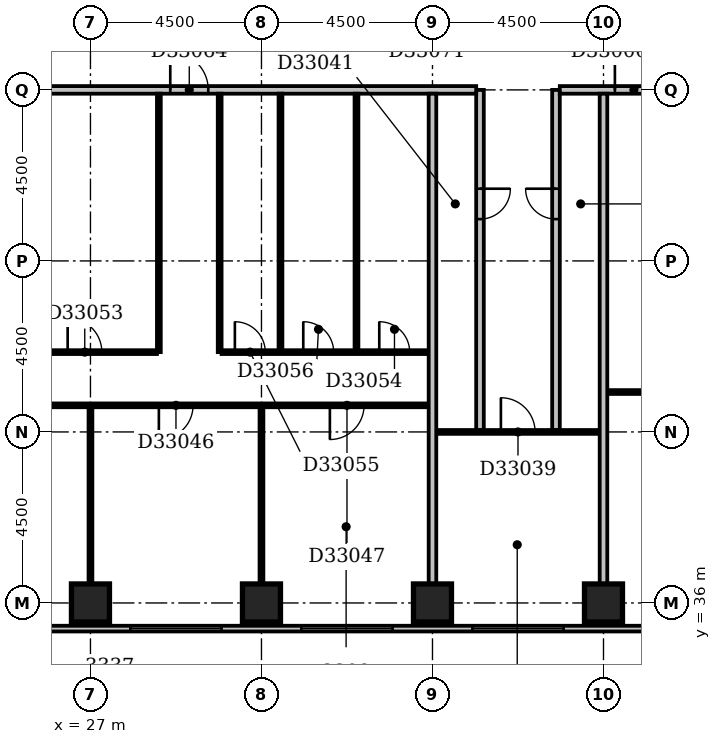
"""IFC4 building model, lengths in metres.
Left out: names, types, materials, properties, quantities, classifications, styles, units other than length and angle.
Written with IfcOpenShell. Run it as: python <this file> out.ifc"""

import sys

from ifc_helpers import new_model, si_unit, direction, frame, frame_2d, origin, origin_2d, place, context, subcontext, project, spatial, rectangle, extrude, element, fill, save


model = new_model("IFC4")
c1 = context("Model", 3, precision=1e-05, world=origin(), true_north=direction((0.0, 1.0)))
c2 = subcontext(c1, "Body", "Model", "MODEL_VIEW")
j1 = project(units=[si_unit("LENGTHUNIT", "METRE"), si_unit("PLANEANGLEUNIT", "RADIAN")], contexts=[c1])
p1 = place(None, origin())
s1 = spatial("IfcSite", under=j1, at=p1, CompositionType="ELEMENT")
p2 = place(p1, origin())
s2 = spatial("IfcBuilding", under=s1, at=p2, CompositionType="ELEMENT")
p3 = place(p2, frame((0.0, 0.0, 134.0)))
s3 = spatial("IfcBuildingStorey", under=s2, at=p3, CompositionType="ELEMENT", Elevation=134.0)
for number, where, z_axis, x_axis in (
    (1, (27.0, 36.0, -0.3), (0.0, 0.0, 1.0), (1.0, 0.0, 0.0)),
    (2, (31.5, 36.0, -0.3), (0.0, 0.0, 1.0), (1.0, 0.0, 0.0)),
    (3, (36.0, 36.0, -0.3), (0.0, 0.0, 1.0), (1.0, 0.0, 0.0)),
    (4, (40.5, 36.0, -0.3), (0.0, 0.0, 1.0), (1.0, 0.0, 0.0)),
):
    element("IfcColumn", number, at=place(p3, frame(where, z_axis=z_axis, x_axis=x_axis)), inside=s3, PredefinedType="COLUMN", context=c2, shape_type="SweptSolid", body=[
        extrude(rectangle(XDim=1.0, YDim=1.0, at=origin_2d()), origin(), (0.0, 0.0, 1.0), 3.6),
    ])
p4 = place(p3, frame((23.1, 35.325, 0.0), z_axis=(0.0, 0.0, 1.0), x_axis=(1.0, 0.0, 0.0)))
e5 = element("IfcWall", 5, at=p4, inside=s3, PredefinedType="STANDARD", context=c2, shape_type="SweptSolid", body=[
    extrude(rectangle(XDim=45.15, YDim=0.15, at=frame_2d((22.575, 0.0))), origin(), (0.0, 0.0, 1.0), 2.7),
])
p5 = place(p4, frame((0.312, 0.0, 0.6)))
e6 = element("IfcOpeningElement", 6, at=p5, cuts=e5, PredefinedType="OPENING", context=c2, shape_type="SweptSolid", body=[
    extrude(rectangle(XDim=2.1, YDim=1.8, at=frame_2d((1.05, 0.9))), frame((0.0, 0.087, 0.0), z_axis=(0.0, -1.0, 0.0), x_axis=(1.0, 0.0, 0.0)), (0.0, 0.0, 1.0), 0.174),
])
p6 = place(p4, frame((4.95, 0.0, 0.6)))
e7 = element("IfcOpeningElement", 7, at=p6, cuts=e5, PredefinedType="OPENING", context=c2, shape_type="SweptSolid", body=[
    extrude(rectangle(XDim=2.4, YDim=1.8, at=frame_2d((1.2, 0.9))), frame((0.0, 0.087, 0.0), z_axis=(0.0, -1.0, 0.0), x_axis=(1.0, 0.0, 0.0)), (0.0, 0.0, 1.0), 0.174),
])
p7 = place(p4, frame((9.45, 0.0, 0.6)))
e8 = element("IfcOpeningElement", 8, at=p7, cuts=e5, PredefinedType="OPENING", context=c2, shape_type="SweptSolid", body=[
    extrude(rectangle(XDim=2.4, YDim=1.8, at=frame_2d((1.2, 0.9))), frame((0.0, 0.087, 0.0), z_axis=(0.0, -1.0, 0.0), x_axis=(1.0, 0.0, 0.0)), (0.0, 0.0, 1.0), 0.174),
])
p8 = place(p4, frame((13.95, 0.0, 0.6)))
e9 = element("IfcOpeningElement", 9, at=p8, cuts=e5, PredefinedType="OPENING", context=c2, shape_type="SweptSolid", body=[
    extrude(rectangle(XDim=2.4, YDim=1.8, at=frame_2d((1.2, 0.9))), frame((0.0, 0.087, 0.0), z_axis=(0.0, -1.0, 0.0), x_axis=(1.0, 0.0, 0.0)), (0.0, 0.0, 1.0), 0.174),
])
p9 = place(p4, frame((18.45, 0.0, 0.6)))
e10 = element("IfcOpeningElement", 10, at=p9, cuts=e5, PredefinedType="OPENING", context=c2, shape_type="SweptSolid", body=[
    extrude(rectangle(XDim=2.4, YDim=1.8, at=frame_2d((1.2, 0.9))), frame((0.0, 0.087, 0.0), z_axis=(0.0, -1.0, 0.0), x_axis=(1.0, 0.0, 0.0)), (0.0, 0.0, 1.0), 0.174),
])
p10 = place(p4, frame((24.146, 0.0, 0.6)))
e11 = element("IfcOpeningElement", 11, at=p10, cuts=e5, PredefinedType="OPENING", context=c2, shape_type="SweptSolid", body=[
    extrude(rectangle(XDim=1.5, YDim=1.8, at=frame_2d((0.75, 0.9))), frame((0.0, 0.087, 0.0), z_axis=(0.0, -1.0, 0.0), x_axis=(1.0, 0.0, 0.0)), (0.0, 0.0, 1.0), 0.174),
])
p11 = place(p4, frame((27.131, 0.0, 0.6)))
e12 = element("IfcOpeningElement", 12, at=p11, cuts=e5, PredefinedType="OPENING", context=c2, shape_type="SweptSolid", body=[
    extrude(rectangle(XDim=2.4, YDim=1.8, at=frame_2d((1.2, 0.9))), frame((0.0, 0.087, 0.0), z_axis=(0.0, -1.0, 0.0), x_axis=(1.0, 0.0, 0.0)), (0.0, 0.0, 1.0), 0.174),
])
p12 = place(p4, frame((31.95, 0.0, 0.6)))
e13 = element("IfcOpeningElement", 13, at=p12, cuts=e5, PredefinedType="OPENING", context=c2, shape_type="SweptSolid", body=[
    extrude(rectangle(XDim=2.4, YDim=1.8, at=frame_2d((1.2, 0.9))), frame((0.0, 0.087, 0.0), z_axis=(0.0, -1.0, 0.0), x_axis=(1.0, 0.0, 0.0)), (0.0, 0.0, 1.0), 0.174),
])
p13 = place(p4, frame((36.45, 0.0, 0.6)))
e14 = element("IfcOpeningElement", 14, at=p13, cuts=e5, PredefinedType="OPENING", context=c2, shape_type="SweptSolid", body=[
    extrude(rectangle(XDim=2.4, YDim=1.8, at=frame_2d((1.2, 0.9))), frame((0.0, 0.087, 0.0), z_axis=(0.0, -1.0, 0.0), x_axis=(1.0, 0.0, 0.0)), (0.0, 0.0, 1.0), 0.174),
])
p14 = place(p4, frame((40.95, 0.0, 0.6)))
e15 = element("IfcOpeningElement", 15, at=p14, cuts=e5, PredefinedType="OPENING", context=c2, shape_type="SweptSolid", body=[
    extrude(rectangle(XDim=2.4, YDim=1.8, at=frame_2d((1.2, 0.9))), frame((0.0, 0.087, 0.0), z_axis=(0.0, -1.0, 0.0), x_axis=(1.0, 0.0, 0.0)), (0.0, 0.0, 1.0), 0.174),
])
p15 = place(p3, frame((27.0, 36.5, 0.0), z_axis=(0.0, 0.0, 1.0), x_axis=(0.0, 1.0, 0.0)))
e16 = element("IfcWall", 16, at=p15, inside=s3, PredefinedType="PARTITIONING", context=c2, shape_type="SweptSolid", body=[
    extrude(rectangle(XDim=4.65, YDim=0.1, at=frame_2d((2.325, 0.0))), origin(), (0.0, 0.0, 1.0), 2.6),
])
p16 = place(p3, frame((31.5, 36.5, 0.0), z_axis=(0.0, 0.0, 1.0), x_axis=(0.0, 1.0, 0.0)))
e17 = element("IfcWall", 17, at=p16, inside=s3, PredefinedType="PARTITIONING", context=c2, shape_type="SweptSolid", body=[
    extrude(rectangle(XDim=4.65, YDim=0.1, at=frame_2d((2.325, 0.0))), origin(), (0.0, 0.0, 1.0), 3.3),
])
p17 = place(p3, frame((36.0, 36.5, 0.0), z_axis=(0.0, 0.0, 1.0), x_axis=(0.0, 1.0, 0.0)))
e18 = element("IfcWall", 18, at=p17, inside=s3, PredefinedType="PARTITIONING", context=c2, shape_type="SweptSolid", body=[
    extrude(rectangle(XDim=12.9, YDim=0.2, at=frame_2d((6.45, 0.0))), origin(), (0.0, 0.0, 1.0), 2.4),
])
p18 = place(p3, frame((40.5, 36.5, 0.0), z_axis=(0.0, 0.0, 1.0), x_axis=(0.0, 1.0, 0.0)))
e19 = element("IfcWall", 19, at=p18, inside=s3, PredefinedType="PARTITIONING", context=c2, shape_type="SweptSolid", body=[
    extrude(rectangle(XDim=12.9, YDim=0.2, at=frame_2d((6.45, 0.0))), origin(), (0.0, 0.0, 1.0), 3.3),
])
p19 = place(p3, frame((36.1, 40.5, 0.0), z_axis=(0.0, 0.0, 1.0), x_axis=(1.0, 0.0, 0.0)))
e20 = element("IfcWall", 20, at=p19, inside=s3, PredefinedType="PARTITIONING", context=c2, shape_type="SweptSolid", body=[
    extrude(rectangle(XDim=4.3, YDim=0.1, at=frame_2d((2.15, 0.0))), origin(), (0.0, 0.0, 1.0), 3.3),
])
p20 = place(p19, frame((1.7, 0.0, 0.0)))
e21 = element("IfcOpeningElement", 21, at=p20, cuts=e20, PredefinedType="OPENING", context=c2, shape_type="SweptSolid", body=[
    extrude(rectangle(XDim=0.9, YDim=2.1, at=frame_2d((0.45, 1.05))), frame((0.0, 0.062, 0.0), z_axis=(0.0, -1.0, 0.0), x_axis=(1.0, 0.0, 0.0)), (0.0, 0.0, 1.0), 0.124),
])
p21 = place(p3, frame((37.25, 40.55, 0.0), z_axis=(0.0, 0.0, 1.0), x_axis=(0.0, 1.0, 0.0)))
e22 = element("IfcWall", 22, at=p21, inside=s3, PredefinedType="PARTITIONING", context=c2, shape_type="SweptSolid", body=[
    extrude(rectangle(XDim=8.95, YDim=0.2, at=frame_2d((4.475, 0.0))), origin(), (0.0, 0.0, 1.0), 3.3),
])
p22 = place(p21, frame((5.55, 0.0, 0.0)))
e23 = element("IfcOpeningElement", 23, at=p22, cuts=e22, PredefinedType="OPENING", context=c2, shape_type="SweptSolid", body=[
    extrude(rectangle(XDim=0.8, YDim=2.1, at=frame_2d((0.4, 1.05))), frame((0.0, 0.112, 0.0), z_axis=(0.0, -1.0, 0.0), x_axis=(1.0, 0.0, 0.0)), (0.0, 0.0, 1.0), 0.224),
])
p23 = place(p3, frame((39.25, 40.55, 0.0), z_axis=(0.0, 0.0, 1.0), x_axis=(0.0, 1.0, 0.0)))
e24 = element("IfcWall", 24, at=p23, inside=s3, PredefinedType="PARTITIONING", context=c2, shape_type="SweptSolid", body=[
    extrude(rectangle(XDim=8.95, YDim=0.2, at=frame_2d((4.475, 0.0))), origin(), (0.0, 0.0, 1.0), 3.3),
])
p24 = place(p23, frame((5.55, 0.0, 0.0)))
e25 = element("IfcOpeningElement", 25, at=p24, cuts=e24, PredefinedType="OPENING", context=c2, shape_type="SweptSolid", body=[
    extrude(rectangle(XDim=0.8, YDim=2.1, at=frame_2d((0.4, 1.05))), frame((0.0, 0.112, 0.0), z_axis=(0.0, -1.0, 0.0), x_axis=(1.0, 0.0, 0.0)), (0.0, 0.0, 1.0), 0.224),
])
p25 = place(p3, frame((22.6, 41.2, 0.0), z_axis=(0.0, 0.0, 1.0), x_axis=(1.0, 0.0, 0.0)))
e26 = element("IfcWall", 26, at=p25, inside=s3, PredefinedType="PARTITIONING", context=c2, shape_type="SweptSolid", body=[
    extrude(rectangle(XDim=13.3, YDim=0.1, at=frame_2d((6.65, 0.0))), origin(), (0.0, 0.0, 1.0), 3.3),
])
p26 = place(p25, frame((1.7, 0.0, 0.0)))
e27 = element("IfcOpeningElement", 27, at=p26, cuts=e26, PredefinedType="OPENING", context=c2, shape_type="SweptSolid", body=[
    extrude(rectangle(XDim=0.9, YDim=2.1, at=frame_2d((0.45, 1.05))), frame((0.0, 0.062, 0.0), z_axis=(0.0, -1.0, 0.0), x_axis=(1.0, 0.0, 0.0)), (0.0, 0.0, 1.0), 0.124),
])
p27 = place(p25, frame((6.2, 0.0, 0.0)))
e28 = element("IfcOpeningElement", 28, at=p27, cuts=e26, PredefinedType="OPENING", context=c2, shape_type="SweptSolid", body=[
    extrude(rectangle(XDim=0.9, YDim=2.1, at=frame_2d((0.45, 1.05))), frame((0.0, 0.062, 0.0), z_axis=(0.0, -1.0, 0.0), x_axis=(1.0, 0.0, 0.0)), (0.0, 0.0, 1.0), 0.124),
])
p28 = place(p25, frame((10.7, 0.0, 0.0)))
e29 = element("IfcOpeningElement", 29, at=p28, cuts=e26, PredefinedType="OPENING", context=c2, shape_type="SweptSolid", body=[
    extrude(rectangle(XDim=0.9, YDim=2.1, at=frame_2d((0.45, 1.05))), frame((0.0, 0.062, 0.0), z_axis=(0.0, -1.0, 0.0), x_axis=(1.0, 0.0, 0.0)), (0.0, 0.0, 1.0), 0.124),
])
p29 = place(p3, frame((40.6, 41.55, 0.0), z_axis=(0.0, 0.0, 1.0), x_axis=(1.0, 0.0, 0.0)))
e30 = element("IfcWall", 30, at=p29, inside=s3, PredefinedType="PARTITIONING", context=c2, shape_type="SweptSolid", body=[
    extrude(rectangle(XDim=13.3, YDim=0.1, at=frame_2d((6.65, 0.0))), origin(), (0.0, 0.0, 1.0), 3.3),
])
p30 = place(p29, frame((3.9, 0.0, 0.0)))
e31 = element("IfcOpeningElement", 31, at=p30, cuts=e30, PredefinedType="OPENING", context=c2, shape_type="SweptSolid", body=[
    extrude(rectangle(XDim=0.9, YDim=2.1, at=frame_2d((0.45, 1.05))), frame((0.0, 0.062, 0.0), z_axis=(0.0, -1.0, 0.0), x_axis=(1.0, 0.0, 0.0)), (0.0, 0.0, 1.0), 0.124),
])
p31 = place(p29, frame((10.7, 0.0, 0.0)))
e32 = element("IfcOpeningElement", 32, at=p31, cuts=e30, PredefinedType="OPENING", context=c2, shape_type="SweptSolid", body=[
    extrude(rectangle(XDim=0.9, YDim=2.1, at=frame_2d((0.45, 1.05))), frame((0.0, 0.062, 0.0), z_axis=(0.0, -1.0, 0.0), x_axis=(1.0, 0.0, 0.0)), (0.0, 0.0, 1.0), 0.124),
])
p32 = place(p3, frame((22.6, 42.6, 0.0), z_axis=(0.0, 0.0, 1.0), x_axis=(1.0, 0.0, 0.0)))
e33 = element("IfcWall", 33, at=p32, inside=s3, PredefinedType="PARTITIONING", context=c2, shape_type="SweptSolid", body=[
    extrude(rectangle(XDim=6.15, YDim=0.1, at=frame_2d((3.075, 0.0))), origin(), (0.0, 0.0, 1.0), 3.3),
])
p33 = place(p32, frame((0.7, 0.0, 0.0)))
e34 = element("IfcOpeningElement", 34, at=p33, cuts=e33, PredefinedType="OPENING", context=c2, shape_type="SweptSolid", body=[
    extrude(rectangle(XDim=0.8, YDim=2.1, at=frame_2d((0.4, 1.05))), frame((0.0, 0.062, 0.0), z_axis=(0.0, -1.0, 0.0), x_axis=(1.0, 0.0, 0.0)), (0.0, 0.0, 1.0), 0.124),
])
p34 = place(p32, frame((3.8, 0.0, 0.0)))
e35 = element("IfcOpeningElement", 35, at=p34, cuts=e33, PredefinedType="OPENING", context=c2, shape_type="SweptSolid", body=[
    extrude(rectangle(XDim=0.9, YDim=2.1, at=frame_2d((0.45, 1.05))), frame((0.0, 0.062, 0.0), z_axis=(0.0, -1.0, 0.0), x_axis=(1.0, 0.0, 0.0)), (0.0, 0.0, 1.0), 0.124),
])
for number, where, z_axis, x_axis in (
    (36, (28.8, 42.6, 0.0), (0.0, 0.0, 1.0), (0.0, 1.0, 0.0)),
    (37, (30.4, 42.6, 0.0), (0.0, 0.0, 1.0), (0.0, 1.0, 0.0)),
):
    element("IfcWall", number, at=place(p3, frame(where, z_axis=z_axis, x_axis=x_axis)), inside=s3, PredefinedType="PARTITIONING", context=c2, shape_type="SweptSolid", body=[
        extrude(rectangle(XDim=6.8, YDim=0.1, at=frame_2d((3.4, 0.0))), origin(), (0.0, 0.0, 1.0), 3.3),
    ])
p35 = place(p3, frame((30.45, 42.6, 0.0), z_axis=(0.0, 0.0, 1.0), x_axis=(1.0, 0.0, 0.0)))
e38 = element("IfcWall", 38, at=p35, inside=s3, PredefinedType="PARTITIONING", context=c2, shape_type="SweptSolid", body=[
    extrude(rectangle(XDim=5.45, YDim=0.1, at=frame_2d((2.725, 0.0))), origin(), (0.0, 0.0, 1.0), 3.3),
])
p36 = place(p35, frame((4.15, 0.0, 0.0)))
e39 = element("IfcOpeningElement", 39, at=p36, cuts=e38, PredefinedType="OPENING", context=c2, shape_type="SweptSolid", body=[
    extrude(rectangle(XDim=0.8, YDim=2.1, at=frame_2d((0.4, 1.05))), frame((0.0, 0.062, 0.0), z_axis=(0.0, -1.0, 0.0), x_axis=(1.0, 0.0, 0.0)), (0.0, 0.0, 1.0), 0.124),
])
p37 = place(p35, frame((0.35, 0.0, 0.0)))
e40 = element("IfcOpeningElement", 40, at=p37, cuts=e38, PredefinedType="OPENING", context=c2, shape_type="SweptSolid", body=[
    extrude(rectangle(XDim=0.8, YDim=2.1, at=frame_2d((0.4, 1.05))), frame((0.0, 0.062, 0.0), z_axis=(0.0, -1.0, 0.0), x_axis=(1.0, 0.0, 0.0)), (0.0, 0.0, 1.0), 0.124),
])
p38 = place(p35, frame((2.15, 0.0, 0.0)))
e41 = element("IfcOpeningElement", 41, at=p38, cuts=e38, PredefinedType="OPENING", context=c2, shape_type="SweptSolid", body=[
    extrude(rectangle(XDim=0.8, YDim=2.1, at=frame_2d((0.4, 1.05))), frame((0.0, 0.062, 0.0), z_axis=(0.0, -1.0, 0.0), x_axis=(1.0, 0.0, 0.0)), (0.0, 0.0, 1.0), 0.124),
])
for number, where, z_axis, x_axis in (
    (42, (32.0, 42.65, 0.0), (0.0, 0.0, 1.0), (0.0, 1.0, 0.0)),
    (43, (34.0, 42.65, 0.0), (0.0, 0.0, 1.0), (0.0, 1.0, 0.0)),
):
    element("IfcWall", number, at=place(p3, frame(where, z_axis=z_axis, x_axis=x_axis)), inside=s3, PredefinedType="PARTITIONING", context=c2, shape_type="SweptSolid", body=[
        extrude(rectangle(XDim=6.75, YDim=0.1, at=frame_2d((3.375, 0.0))), origin(), (0.0, 0.0, 1.0), 3.3),
    ])
p39 = place(p3, frame((9.1, 49.5, 0.0), z_axis=(0.0, 0.0, 1.0), x_axis=(1.0, 0.0, 0.0)))
e44 = element("IfcWall", 44, at=p39, inside=s3, PredefinedType="PARTITIONING", context=c2, shape_type="SweptSolid", body=[
    extrude(rectangle(XDim=28.05, YDim=0.2, at=frame_2d((14.025, 0.0))), origin(), (0.0, 0.0, 1.0), 3.3),
])
p40 = place(p39, frame((20.0, 0.0, 0.0)))
e45 = element("IfcOpeningElement", 45, at=p40, cuts=e44, PredefinedType="OPENING", context=c2, shape_type="SweptSolid", body=[
    extrude(rectangle(XDim=1.0, YDim=2.1, at=frame_2d((0.5, 1.05))), frame((0.0, 0.112, 0.0), z_axis=(0.0, -1.0, 0.0), x_axis=(1.0, 0.0, 0.0)), (0.0, 0.0, 1.0), 0.224),
])
p41 = place(p39, frame((3.9, 0.0, 0.0)))
e46 = element("IfcOpeningElement", 46, at=p41, cuts=e44, PredefinedType="OPENING", context=c2, shape_type="SweptSolid", body=[
    extrude(rectangle(XDim=0.9, YDim=2.1, at=frame_2d((0.45, 1.05))), frame((0.0, 0.112, 0.0), z_axis=(0.0, -1.0, 0.0), x_axis=(1.0, 0.0, 0.0)), (0.0, 0.0, 1.0), 0.224),
])
p42 = place(p3, frame((39.35, 49.5, 0.0), z_axis=(0.0, 0.0, 1.0), x_axis=(1.0, 0.0, 0.0)))
e47 = element("IfcWall", 47, at=p42, inside=s3, PredefinedType="PARTITIONING", context=c2, shape_type="SweptSolid", body=[
    extrude(rectangle(XDim=15.8, YDim=0.2, at=frame_2d((7.9, 0.0))), origin(), (0.0, 0.0, 1.0), 3.3),
])
p43 = place(p42, frame((1.45, 0.0, 0.0)))
e48 = element("IfcOpeningElement", 48, at=p43, cuts=e47, PredefinedType="OPENING", context=c2, shape_type="SweptSolid", body=[
    extrude(rectangle(XDim=1.0, YDim=2.1, at=frame_2d((0.5, 1.05))), frame((0.0, 0.112, 0.0), z_axis=(0.0, -1.0, 0.0), x_axis=(1.0, 0.0, 0.0)), (0.0, 0.0, 1.0), 0.224),
])
p44 = place(p6, origin())
e49 = element("IfcWindow", 49, at=p44, inside=s3, PartitioningType="SINGLE_PANEL", PredefinedType="WINDOW", context=c2, shape_type="SweptSolid", body=[
    extrude(rectangle(XDim=2.4, YDim=1.8, at=frame_2d((1.2, 0.9))), frame((0.0, 0.03, 0.0), z_axis=(0.0, -1.0, 0.0), x_axis=(1.0, 0.0, 0.0)), (0.0, 0.0, 1.0), 0.06),
])
fill(e7, e49)
p45 = place(p7, origin())
e50 = element("IfcWindow", 50, at=p45, inside=s3, PartitioningType="SINGLE_PANEL", PredefinedType="WINDOW", context=c2, shape_type="SweptSolid", body=[
    extrude(rectangle(XDim=2.4, YDim=1.8, at=frame_2d((1.2, 0.9))), frame((0.0, 0.03, 0.0), z_axis=(0.0, -1.0, 0.0), x_axis=(1.0, 0.0, 0.0)), (0.0, 0.0, 1.0), 0.06),
])
fill(e8, e50)
p46 = place(p8, origin())
e51 = element("IfcWindow", 51, at=p46, inside=s3, PartitioningType="SINGLE_PANEL", PredefinedType="WINDOW", context=c2, shape_type="SweptSolid", body=[
    extrude(rectangle(XDim=2.4, YDim=1.8, at=frame_2d((1.2, 0.9))), frame((0.0, 0.03, 0.0), z_axis=(0.0, -1.0, 0.0), x_axis=(1.0, 0.0, 0.0)), (0.0, 0.0, 1.0), 0.06),
])
fill(e9, e51)
p47 = place(p20, origin())
e52 = element("IfcDoor", 52, at=p47, inside=s3, OperationType="SINGLE_SWING_LEFT", PredefinedType="DOOR", context=c2, shape_type="SweptSolid", body=[
    extrude(rectangle(XDim=0.9, YDim=2.1, at=frame_2d((0.45, 1.05))), frame((0.0, 0.025, 0.0), z_axis=(0.0, -1.0, 0.0), x_axis=(1.0, 0.0, 0.0)), (0.0, 0.0, 1.0), 0.05),
])
fill(e21, e52)
p48 = place(p22, origin())
e53 = element("IfcDoor", 53, at=p48, inside=s3, OperationType="SINGLE_SWING_RIGHT", PredefinedType="DOOR", context=c2, shape_type="SweptSolid", body=[
    extrude(rectangle(XDim=0.8, YDim=2.1, at=frame_2d((0.4, 1.05))), frame((0.0, 0.025, 0.0), z_axis=(0.0, -1.0, 0.0), x_axis=(1.0, 0.0, 0.0)), (0.0, 0.0, 1.0), 0.05),
])
fill(e23, e53)
p49 = place(p24, frame((0.8, 0.0, 0.0), z_axis=(0.0, 0.0, 1.0), x_axis=(-1.0, 0.0, 0.0)))
e54 = element("IfcDoor", 54, at=p49, inside=s3, OperationType="SINGLE_SWING_LEFT", PredefinedType="DOOR", context=c2, shape_type="SweptSolid", body=[
    extrude(rectangle(XDim=0.8, YDim=2.1, at=frame_2d((0.4, 1.05))), frame((0.0, 0.025, 0.0), z_axis=(0.0, -1.0, 0.0), x_axis=(1.0, 0.0, 0.0)), (0.0, 0.0, 1.0), 0.05),
])
fill(e25, e54)
p50 = place(p27, frame((0.9, 0.0, 0.0), z_axis=(0.0, 0.0, 1.0), x_axis=(-1.0, 0.0, 0.0)))
e55 = element("IfcDoor", 55, at=p50, inside=s3, OperationType="SINGLE_SWING_RIGHT", PredefinedType="DOOR", context=c2, shape_type="SweptSolid", body=[
    extrude(rectangle(XDim=0.9, YDim=2.1, at=frame_2d((0.45, 1.05))), frame((0.0, 0.025, 0.0), z_axis=(0.0, -1.0, 0.0), x_axis=(1.0, 0.0, 0.0)), (0.0, 0.0, 1.0), 0.05),
])
fill(e28, e55)
p51 = place(p28, frame((0.9, 0.0, 0.0), z_axis=(0.0, 0.0, 1.0), x_axis=(-1.0, 0.0, 0.0)))
e56 = element("IfcDoor", 56, at=p51, inside=s3, OperationType="SINGLE_SWING_RIGHT", PredefinedType="DOOR", context=c2, shape_type="SweptSolid", body=[
    extrude(rectangle(XDim=0.9, YDim=2.1, at=frame_2d((0.45, 1.05))), frame((0.0, 0.025, 0.0), z_axis=(0.0, -1.0, 0.0), x_axis=(1.0, 0.0, 0.0)), (0.0, 0.0, 1.0), 0.05),
])
fill(e29, e56)
p52 = place(p34, origin())
e57 = element("IfcDoor", 57, at=p52, inside=s3, OperationType="SINGLE_SWING_LEFT", PredefinedType="DOOR", context=c2, shape_type="SweptSolid", body=[
    extrude(rectangle(XDim=0.9, YDim=2.1, at=frame_2d((0.45, 1.05))), frame((0.0, 0.025, 0.0), z_axis=(0.0, -1.0, 0.0), x_axis=(1.0, 0.0, 0.0)), (0.0, 0.0, 1.0), 0.05),
])
fill(e35, e57)
p53 = place(p36, origin())
e58 = element("IfcDoor", 58, at=p53, inside=s3, OperationType="SINGLE_SWING_LEFT", PredefinedType="DOOR", context=c2, shape_type="SweptSolid", body=[
    extrude(rectangle(XDim=0.8, YDim=2.1, at=frame_2d((0.4, 1.05))), frame((0.0, 0.025, 0.0), z_axis=(0.0, -1.0, 0.0), x_axis=(1.0, 0.0, 0.0)), (0.0, 0.0, 1.0), 0.05),
])
fill(e39, e58)
p54 = place(p37, origin())
e59 = element("IfcDoor", 59, at=p54, inside=s3, OperationType="SINGLE_SWING_LEFT", PredefinedType="DOOR", context=c2, shape_type="SweptSolid", body=[
    extrude(rectangle(XDim=0.8, YDim=2.1, at=frame_2d((0.4, 1.05))), frame((0.0, 0.025, 0.0), z_axis=(0.0, -1.0, 0.0), x_axis=(1.0, 0.0, 0.0)), (0.0, 0.0, 1.0), 0.05),
])
fill(e40, e59)
p55 = place(p38, origin())
e60 = element("IfcDoor", 60, at=p55, inside=s3, OperationType="SINGLE_SWING_LEFT", PredefinedType="DOOR", context=c2, shape_type="SweptSolid", body=[
    extrude(rectangle(XDim=0.8, YDim=2.1, at=frame_2d((0.4, 1.05))), frame((0.0, 0.025, 0.0), z_axis=(0.0, -1.0, 0.0), x_axis=(1.0, 0.0, 0.0)), (0.0, 0.0, 1.0), 0.05),
])
fill(e41, e60)
p56 = place(p40, origin())
e61 = element("IfcDoor", 61, at=p56, inside=s3, OperationType="SINGLE_SWING_LEFT", PredefinedType="DOOR", context=c2, shape_type="SweptSolid", body=[
    extrude(rectangle(XDim=1.0, YDim=2.1, at=frame_2d((0.5, 1.05))), frame((0.0, 0.025, 0.0), z_axis=(0.0, -1.0, 0.0), x_axis=(1.0, 0.0, 0.0)), (0.0, 0.0, 1.0), 0.05),
])
fill(e45, e61)
p57 = place(p43, origin())
e62 = element("IfcDoor", 62, at=p57, inside=s3, OperationType="SINGLE_SWING_LEFT", PredefinedType="DOOR", context=c2, shape_type="SweptSolid", body=[
    extrude(rectangle(XDim=1.0, YDim=2.1, at=frame_2d((0.5, 1.05))), frame((0.0, 0.025, 0.0), z_axis=(0.0, -1.0, 0.0), x_axis=(1.0, 0.0, 0.0)), (0.0, 0.0, 1.0), 0.05),
])
fill(e48, e62)
save(model, sys.argv[1])
